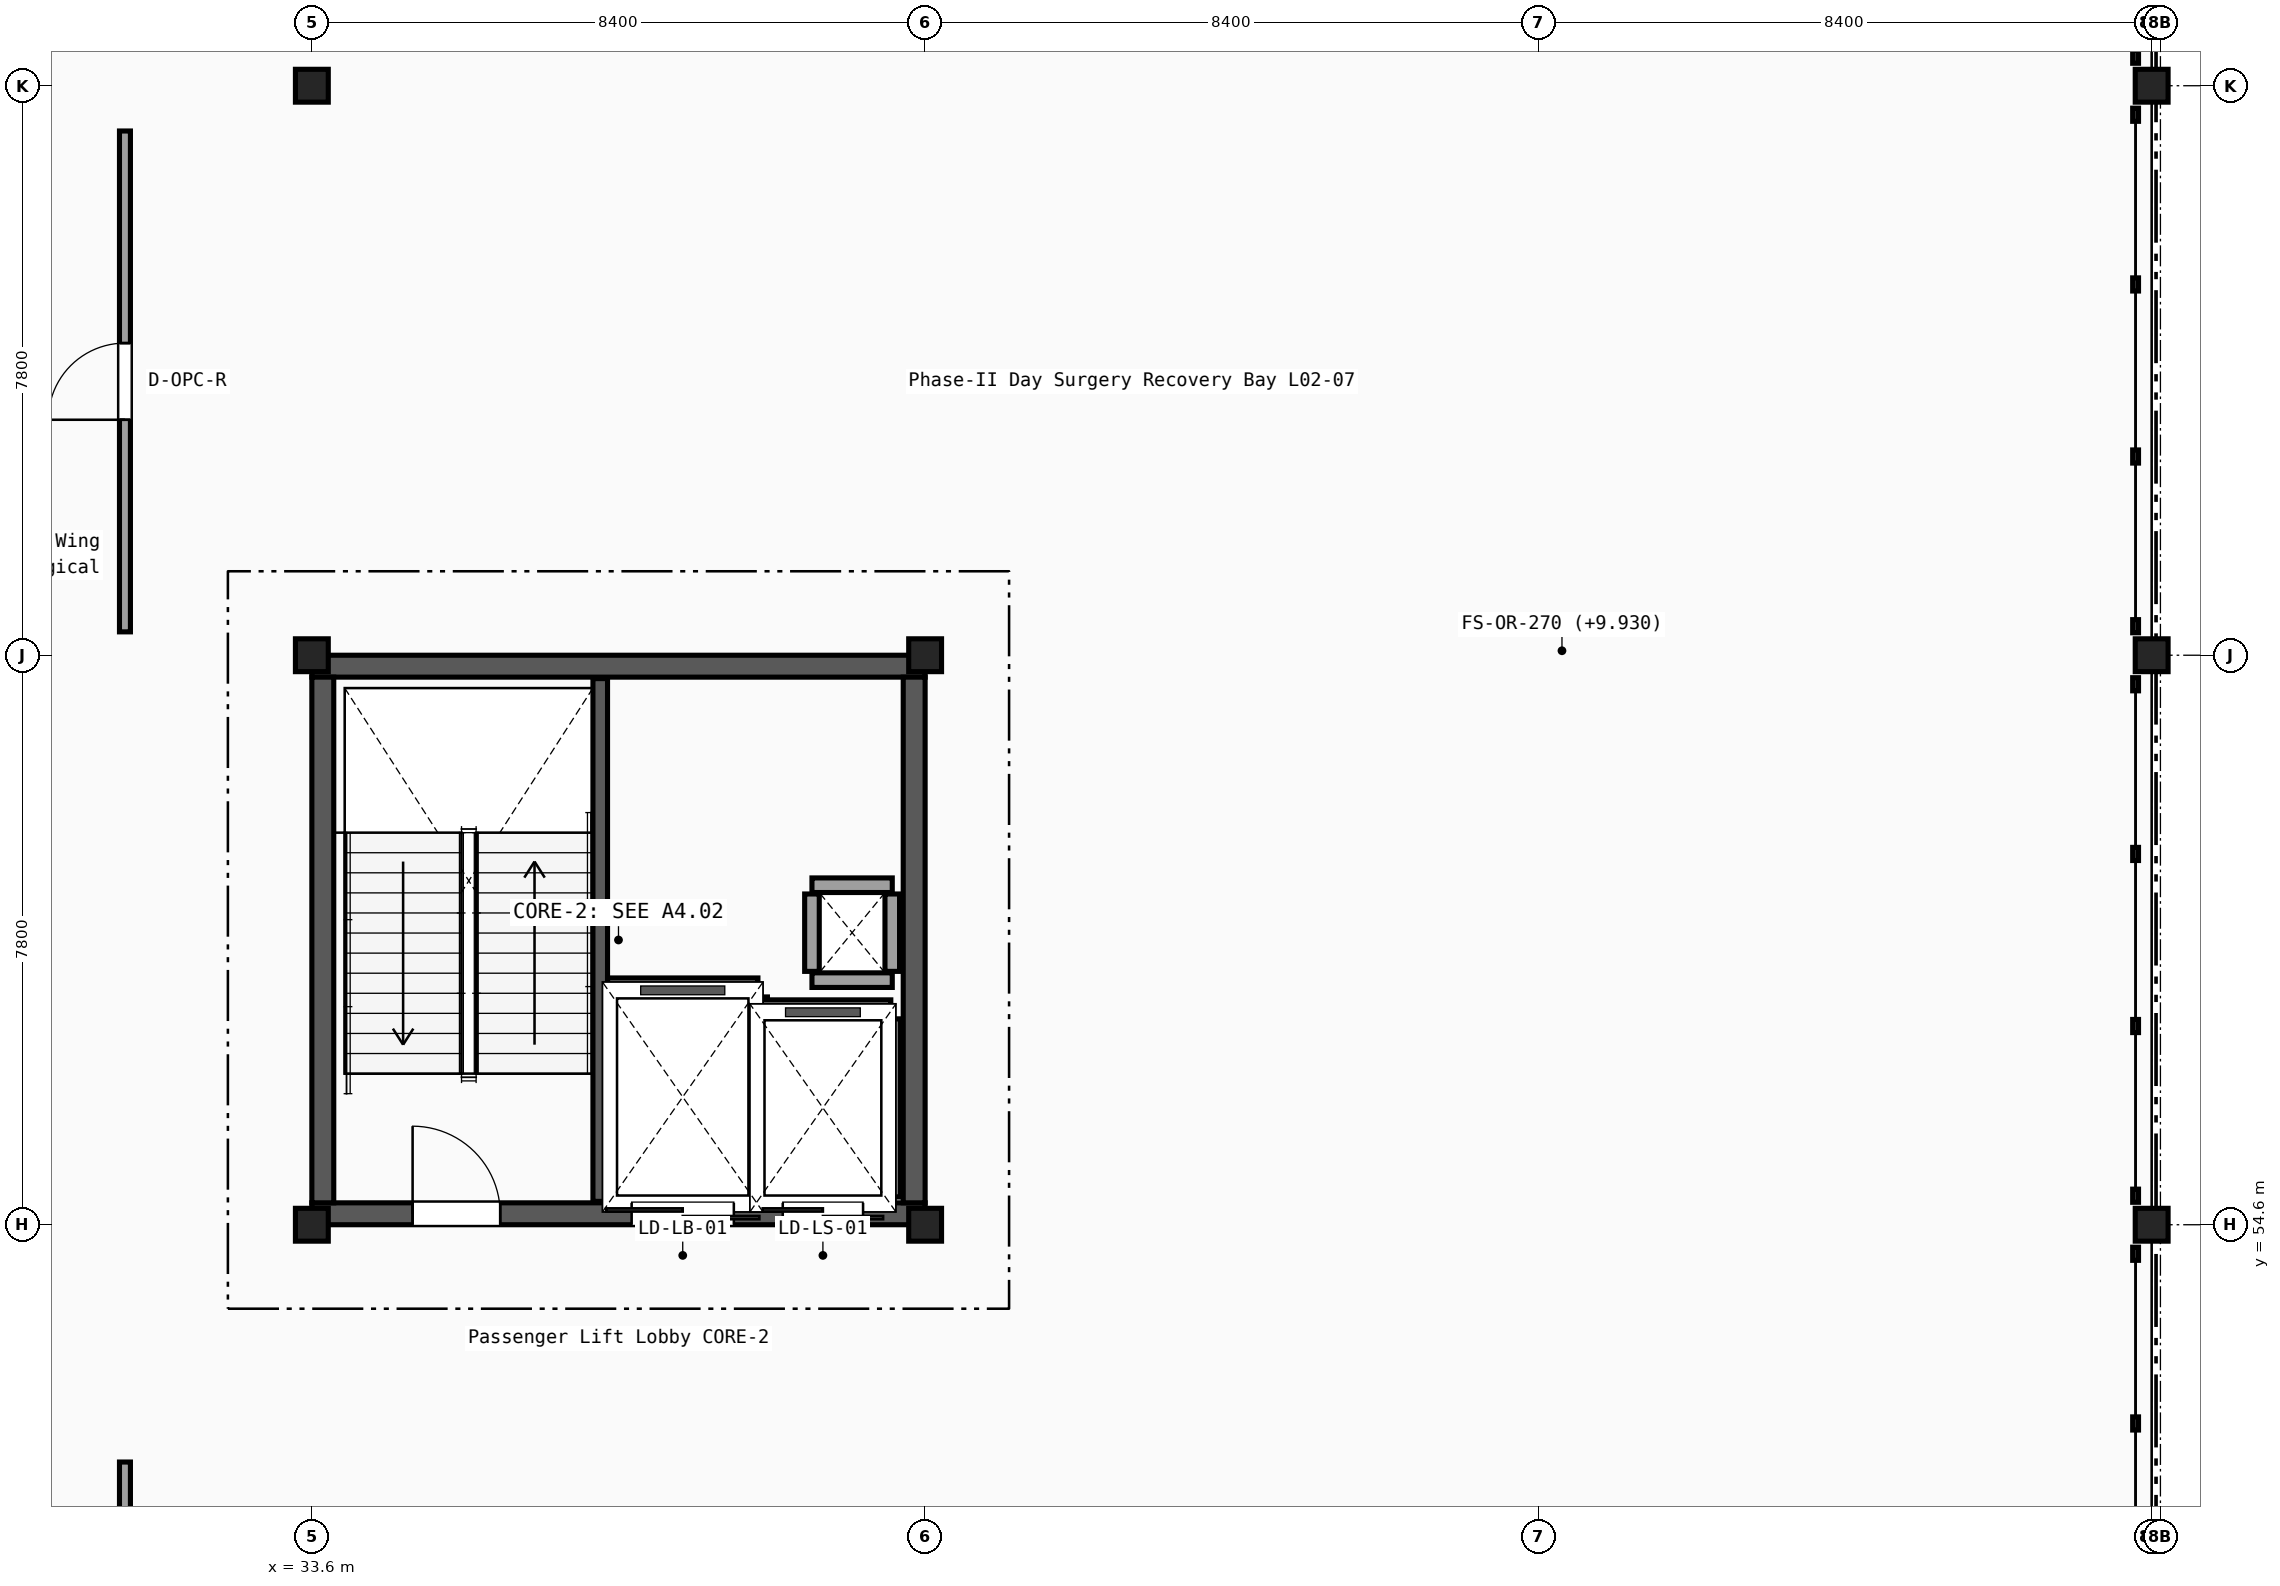
"""IFC4 building model, lengths in metres.
Left out: names, types, materials, properties, quantities, classifications, styles, units other than length and angle.
Written with IfcOpenShell. Run it as: python <this file> out.ifc"""

import sys

from ifc_helpers import new_model, si_unit, direction, frame, frame_2d, origin, origin_2d, place, context, subcontext, project, spatial, rectangle, i_section, extrude, element, fill, save


model = new_model("IFC4")
c1 = context("Model", 3, precision=1e-05, world=origin(), true_north=direction((0.0, 1.0)))
c2 = subcontext(c1, "Body", "Model", "MODEL_VIEW")
j1 = project(units=[si_unit("LENGTHUNIT", "METRE"), si_unit("PLANEANGLEUNIT", "RADIAN")], contexts=[c1])
p1 = place(None, origin())
s1 = spatial("IfcSite", under=j1, at=p1, CompositionType="ELEMENT")
p2 = place(p1, origin())
s2 = spatial("IfcBuilding", under=s1, at=p2, CompositionType="ELEMENT")
p3 = place(p2, frame((0.0, 0.0, 10.2)))
s3 = spatial("IfcBuildingStorey", under=s2, at=p3, CompositionType="ELEMENT", Elevation=10.2)
for number, where, z_axis, x_axis in (
    (1, (33.6, 54.6, 0.0), (0.0, 0.0, 1.0), (1.0, 0.0, 0.0)),
    (2, (33.6, 62.4, 0.0), (0.0, 0.0, 1.0), (1.0, 0.0, 0.0)),
    (3, (33.6, 70.2, 0.0), (0.0, 0.0, 1.0), (1.0, 0.0, 0.0)),
    (4, (42.0, 54.6, 0.0), (0.0, 0.0, 1.0), (1.0, 0.0, 0.0)),
    (5, (42.0, 62.4, 0.0), (0.0, 0.0, 1.0), (1.0, 0.0, 0.0)),
    (6, (58.8, 54.6, 0.0), (0.0, 0.0, 1.0), (1.0, 0.0, 0.0)),
    (7, (58.8, 62.4, 0.0), (0.0, 0.0, 1.0), (1.0, 0.0, 0.0)),
    (8, (58.8, 70.2, 0.0), (0.0, 0.0, 1.0), (1.0, 0.0, 0.0)),
):
    element("IfcColumn", number, at=place(p3, frame(where, z_axis=z_axis, x_axis=x_axis)), inside=s3, PredefinedType="COLUMN", context=c2, shape_type="SweptSolid", body=[
        extrude(i_section(OverallWidth=0.3, OverallDepth=0.45, WebThickness=0.014, FlangeThickness=0.026, FilletRadius=0.027, at=origin_2d()), origin(), (0.0, 0.0, 1.0), 4.65),
    ])
p4 = place(p3, frame((33.6, 54.75, 0.0), z_axis=(0.0, 0.0, 1.0), x_axis=(1.0, 0.0, 0.0)))
e9 = element("IfcWall", 9, at=p4, inside=s3, PredefinedType="SHEAR", context=c2, shape_type="SweptSolid", body=[
    extrude(rectangle(XDim=8.4, YDim=0.3, at=frame_2d((4.2, 0.0))), origin(), (0.0, 0.0, 1.0), 4.38),
])
p5 = place(p4, frame((1.38, 0.0, 0.0)))
e10 = element("IfcOpeningElement", 10, at=p5, cuts=e9, PredefinedType="OPENING", context=c2, shape_type="SweptSolid", body=[
    extrude(rectangle(XDim=1.2, YDim=2.15, at=frame_2d((0.6, 1.075))), frame((0.0, 0.16, 0.0), z_axis=(0.0, -1.0, 0.0), x_axis=(1.0, 0.0, 0.0)), (0.0, 0.0, 1.0), 0.32),
])
p6 = place(p4, frame((4.38, 0.0, 0.0)))
e11 = element("IfcOpeningElement", 11, at=p6, cuts=e9, PredefinedType="OPENING", context=c2, shape_type="SweptSolid", body=[
    extrude(rectangle(XDim=1.4, YDim=2.2, at=frame_2d((0.7, 1.1))), frame((0.0, 0.16, 0.0), z_axis=(0.0, -1.0, 0.0), x_axis=(1.0, 0.0, 0.0)), (0.0, 0.0, 1.0), 0.32),
])
p7 = place(p4, frame((6.45, 0.0, 0.0)))
e12 = element("IfcOpeningElement", 12, at=p7, cuts=e9, PredefinedType="OPENING", context=c2, shape_type="SweptSolid", body=[
    extrude(rectangle(XDim=1.1, YDim=2.15, at=frame_2d((0.55, 1.075))), frame((0.0, 0.16, 0.0), z_axis=(0.0, -1.0, 0.0), x_axis=(1.0, 0.0, 0.0)), (0.0, 0.0, 1.0), 0.32),
])
p8 = place(p3, frame((33.6, 62.25, 0.0), z_axis=(0.0, 0.0, 1.0), x_axis=(1.0, 0.0, 0.0)))
e13 = element("IfcWall", 13, at=p8, inside=s3, PredefinedType="SHEAR", context=c2, shape_type="SweptSolid", body=[
    extrude(rectangle(XDim=8.4, YDim=0.3, at=frame_2d((4.2, 0.0))), origin(), (0.0, 0.0, 1.0), 4.38),
])
for number, where, z_axis, x_axis in (
    (14, (33.75, 54.9, 0.0), (0.0, 0.0, 1.0), (0.0, 1.0, 0.0)),
    (15, (41.85, 54.9, 0.0), (0.0, 0.0, 1.0), (0.0, 1.0, 0.0)),
):
    element("IfcWall", number, at=place(p3, frame(where, z_axis=z_axis, x_axis=x_axis)), inside=s3, PredefinedType="SHEAR", context=c2, shape_type="SweptSolid", body=[
        extrude(rectangle(XDim=7.2, YDim=0.3, at=frame_2d((3.6, 0.0))), origin(), (0.0, 0.0, 1.0), 4.38),
    ])
p9 = place(p3, frame((37.55, 54.92, 0.0), z_axis=(0.0, 0.0, 1.0), x_axis=(0.0, 1.0, 0.0)))
e16 = element("IfcWall", 16, at=p9, inside=s3, PredefinedType="SHEAR", context=c2, shape_type="SweptSolid", body=[
    extrude(rectangle(XDim=7.16, YDim=0.2, at=frame_2d((3.58, 0.0))), origin(), (0.0, 0.0, 1.0), 4.38),
])
for number, where, z_axis, x_axis in (
    (17, (40.45, 57.95, 0.0), (0.0, 0.0, 1.0), (1.0, 0.0, 0.0)),
    (18, (40.45, 59.25, 0.0), (0.0, 0.0, 1.0), (1.0, 0.0, 0.0)),
):
    element("IfcWall", number, at=place(p3, frame(where, z_axis=z_axis, x_axis=x_axis)), inside=s3, PredefinedType="PARTITIONING", context=c2, shape_type="SweptSolid", body=[
        extrude(rectangle(XDim=1.1, YDim=0.2, at=frame_2d((0.55, 0.0))), origin(), (0.0, 0.0, 1.0), 3.82),
    ])
for number, where, z_axis, x_axis in (
    (19, (40.45, 58.07, 0.0), (0.0, 0.0, 1.0), (0.0, 1.0, 0.0)),
    (20, (41.55, 58.07, 0.0), (0.0, 0.0, 1.0), (0.0, 1.0, 0.0)),
):
    element("IfcWall", number, at=place(p3, frame(where, z_axis=z_axis, x_axis=x_axis)), inside=s3, PredefinedType="PARTITIONING", context=c2, shape_type="SweptSolid", body=[
        extrude(rectangle(XDim=1.06, YDim=0.2, at=frame_2d((0.53, 0.0))), origin(), (0.0, 0.0, 1.0), 3.82),
    ])
p10 = place(p3, frame((39.74, 54.98, 0.0), z_axis=(0.0, 0.0, 1.0), x_axis=(0.0, 1.0, 0.0)))
e21 = element("IfcWall", 21, at=p10, inside=s3, PredefinedType="PARTITIONING", context=c2, shape_type="SweptSolid", body=[
    extrude(rectangle(XDim=2.74, YDim=0.2, at=frame_2d((1.37, 0.0))), origin(), (0.0, 0.0, 1.0), 3.82),
])
p11 = place(p3, frame((37.65, 57.88, 0.0), z_axis=(0.0, 0.0, 1.0), x_axis=(1.0, 0.0, 0.0)))
e22 = element("IfcWall", 22, at=p11, inside=s3, PredefinedType="PARTITIONING", context=c2, shape_type="SweptSolid", body=[
    extrude(rectangle(XDim=2.06, YDim=0.2, at=frame_2d((1.03, 0.0))), origin(), (0.0, 0.0, 1.0), 3.82),
])
p12 = place(p3, frame((41.56, 54.98, 0.0), z_axis=(0.0, 0.0, 1.0), x_axis=(0.0, 1.0, 0.0)))
e23 = element("IfcWall", 23, at=p12, inside=s3, PredefinedType="PARTITIONING", context=c2, shape_type="SweptSolid", body=[
    extrude(rectangle(XDim=2.44, YDim=0.2, at=frame_2d((1.22, 0.0))), origin(), (0.0, 0.0, 1.0), 3.82),
])
p13 = place(p3, frame((39.67, 57.58, 0.0), z_axis=(0.0, 0.0, 1.0), x_axis=(1.0, 0.0, 0.0)))
e24 = element("IfcWall", 24, at=p13, inside=s3, PredefinedType="PARTITIONING", context=c2, shape_type="SweptSolid", body=[
    extrude(rectangle(XDim=1.86, YDim=0.2, at=frame_2d((0.93, 0.0))), origin(), (0.0, 0.0, 1.0), 3.82),
])
p14 = place(p3, frame((31.04, 39.62, 0.0), z_axis=(0.0, 0.0, 1.0), x_axis=(0.0, 1.0, 0.0)))
e25 = element("IfcWall", 25, at=p14, inside=s3, PredefinedType="PARTITIONING", context=c2, shape_type="SweptSolid", body=[
    extrude(rectangle(XDim=11.73, YDim=0.15, at=frame_2d((5.865, 0.0))), origin(), (0.0, 0.0, 1.0), 3.82),
])
p15 = place(p14, frame((4.965, 0.0, 0.0)))
e26 = element("IfcOpeningElement", 26, at=p15, cuts=e25, PredefinedType="OPENING", context=c2, shape_type="SweptSolid", body=[
    extrude(rectangle(XDim=1.8, YDim=2.4, at=frame_2d((0.9, 1.2))), frame((0.0, 0.085, 0.0), z_axis=(0.0, -1.0, 0.0), x_axis=(1.0, 0.0, 0.0)), (0.0, 0.0, 1.0), 0.17),
])
p16 = place(p3, frame((31.04, 62.72, 0.0), z_axis=(0.0, 0.0, 1.0), x_axis=(0.0, 1.0, 0.0)))
e27 = element("IfcWall", 27, at=p16, inside=s3, PredefinedType="PARTITIONING", context=c2, shape_type="SweptSolid", body=[
    extrude(rectangle(XDim=6.86, YDim=0.15, at=frame_2d((3.43, 0.0))), origin(), (0.0, 0.0, 1.0), 3.82),
])
p17 = place(p16, frame((2.905, 0.0, 0.0)))
e28 = element("IfcOpeningElement", 28, at=p17, cuts=e27, PredefinedType="OPENING", context=c2, shape_type="SweptSolid", body=[
    extrude(rectangle(XDim=1.05, YDim=2.15, at=frame_2d((0.525, 1.075))), frame((0.0, 0.085, 0.0), z_axis=(0.0, -1.0, 0.0), x_axis=(1.0, 0.0, 0.0)), (0.0, 0.0, 1.0), 0.17),
])
p18 = place(p5, origin())
e29 = element("IfcDoor", 29, at=p18, inside=s3, OperationType="SINGLE_SWING_LEFT", PredefinedType="DOOR", context=c2, shape_type="SweptSolid", body=[
    extrude(rectangle(XDim=1.2, YDim=2.15, at=frame_2d((0.6, 1.075))), frame((0.0, 0.025, 0.0), z_axis=(0.0, -1.0, 0.0), x_axis=(1.0, 0.0, 0.0)), (0.0, 0.0, 1.0), 0.05),
])
fill(e10, e29)
p19 = place(p6, origin())
e30 = element("IfcDoor", 30, at=p19, inside=s3, OperationType="DOUBLE_DOOR_SLIDING", PredefinedType="DOOR", context=c2, shape_type="SweptSolid", body=[
    extrude(rectangle(XDim=1.4, YDim=2.2, at=frame_2d((0.7, 1.1))), frame((0.0, 0.025, 0.0), z_axis=(0.0, -1.0, 0.0), x_axis=(1.0, 0.0, 0.0)), (0.0, 0.0, 1.0), 0.05),
])
fill(e11, e30)
p20 = place(p7, origin())
e31 = element("IfcDoor", 31, at=p20, inside=s3, OperationType="DOUBLE_DOOR_SLIDING", PredefinedType="DOOR", context=c2, shape_type="SweptSolid", body=[
    extrude(rectangle(XDim=1.1, YDim=2.15, at=frame_2d((0.55, 1.075))), frame((0.0, 0.025, 0.0), z_axis=(0.0, -1.0, 0.0), x_axis=(1.0, 0.0, 0.0)), (0.0, 0.0, 1.0), 0.05),
])
fill(e12, e31)
p21 = place(p17, origin())
e32 = element("IfcDoor", 32, at=p21, inside=s3, OperationType="SINGLE_SWING_LEFT", PredefinedType="DOOR", context=c2, shape_type="SweptSolid", body=[
    extrude(rectangle(XDim=1.05, YDim=2.15, at=frame_2d((0.525, 1.075))), frame((0.0, 0.025, 0.0), z_axis=(0.0, -1.0, 0.0), x_axis=(1.0, 0.0, 0.0)), (0.0, 0.0, 1.0), 0.05),
])
fill(e28, e32)
save(model, sys.argv[1])
